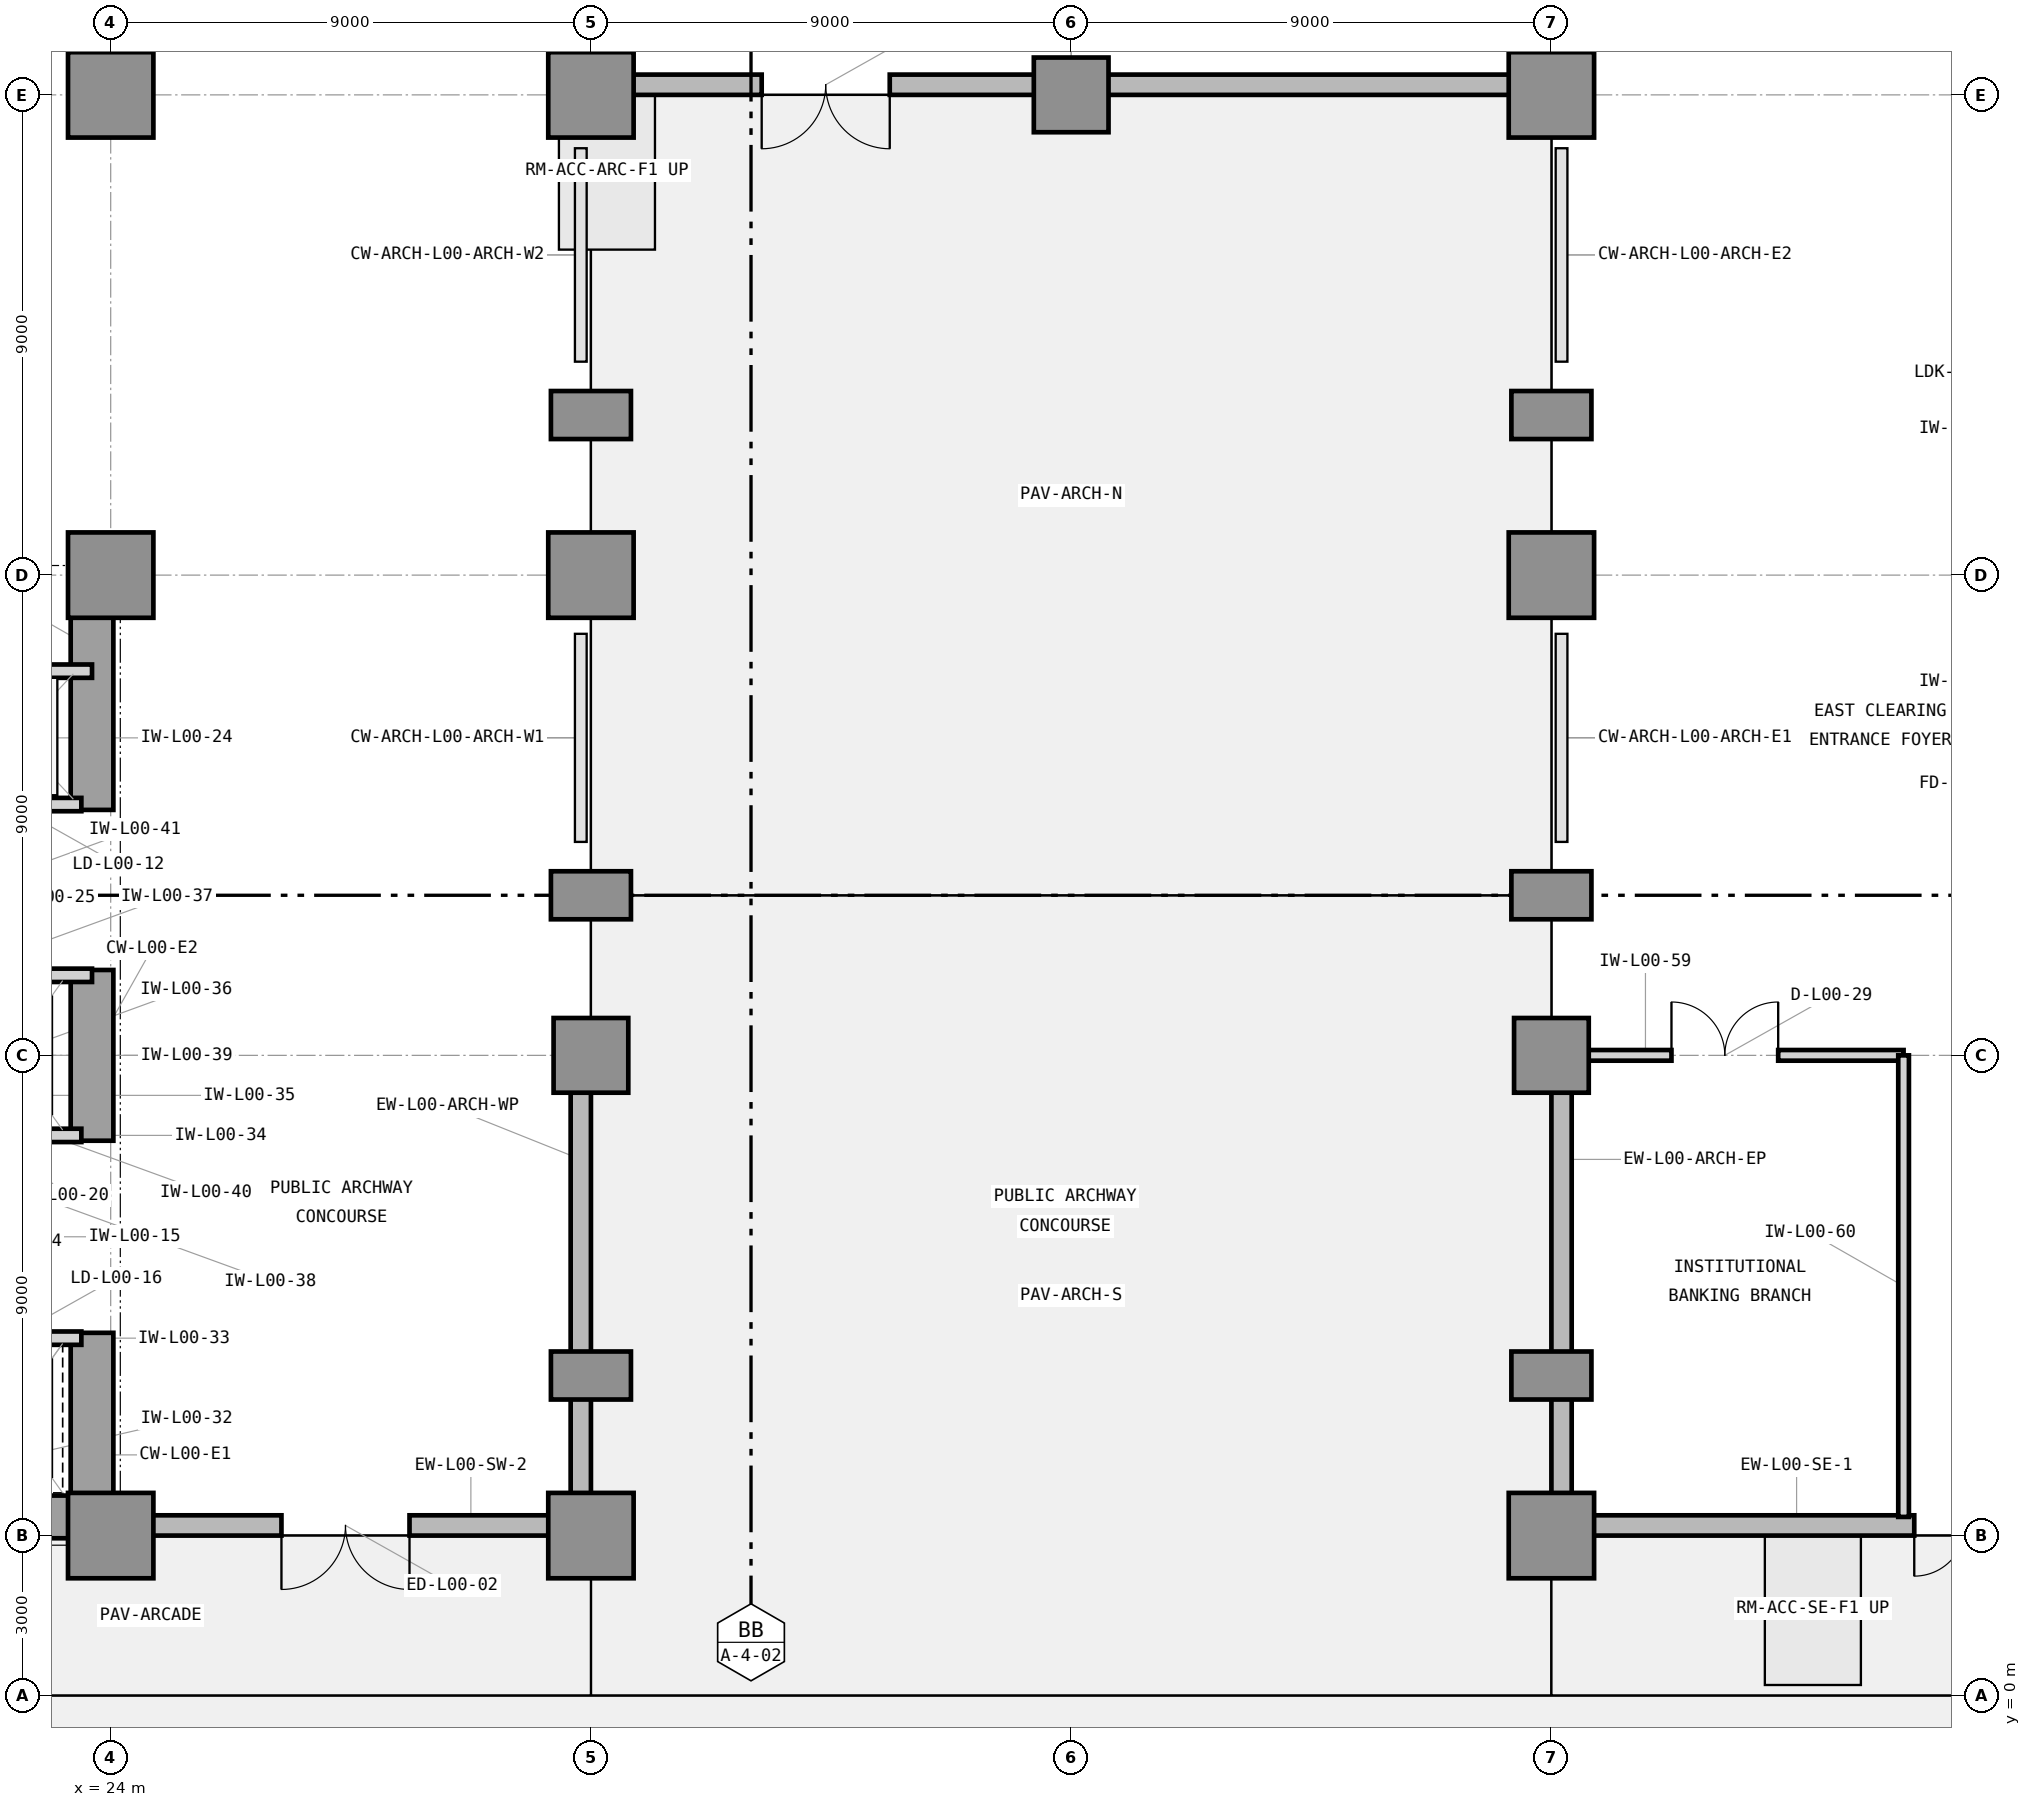
"""IFC4 building model, lengths in metres.
Left out: names, types, materials, properties, quantities, classifications, styles, units other than length and angle.
Written with IfcOpenShell. Run it as: python <this file> out.ifc"""

import sys

from ifc_helpers import new_model, si_unit, direction, frame, frame_2d, origin, origin_2d, place, context, subcontext, project, spatial, rectangle, extrude, element, fill, save


model = new_model("IFC4")
c1 = context("Model", 3, precision=1e-05, world=origin(), true_north=direction((0.0, 1.0)))
c2 = subcontext(c1, "Body", "Model", "MODEL_VIEW")
j1 = project(units=[si_unit("LENGTHUNIT", "METRE"), si_unit("PLANEANGLEUNIT", "RADIAN")], contexts=[c1])
p1 = place(None, origin())
s1 = spatial("IfcSite", under=j1, at=p1, CompositionType="ELEMENT")
p2 = place(p1, origin())
s2 = spatial("IfcBuilding", under=s1, at=p2, CompositionType="ELEMENT")
p3 = place(p2, origin())
s3 = spatial("IfcBuildingStorey", under=s2, at=p3, CompositionType="ELEMENT", Elevation=0.0)
p4 = place(p3, frame((7.475, 3.35, 0.0), z_axis=(0.0, 0.0, 1.0), x_axis=(1.0, 0.0, 0.0)))
e1 = element("IfcWall", 1, at=p4, inside=s3, PredefinedType="SHEAR", context=c2, shape_type="SweptSolid", body=[
    extrude(rectangle(XDim=16.575, YDim=0.8, at=frame_2d((8.288, 0.0))), origin(), (0.0, 0.0, 1.0), 5.4),
])
p5 = place(p3, frame((23.65, 3.75, 0.0), z_axis=(0.0, 0.0, 1.0), x_axis=(0.0, 1.0, 0.0)))
e2 = element("IfcWall", 2, at=p5, inside=s3, PredefinedType="SHEAR", context=c2, shape_type="SweptSolid", body=[
    extrude(rectangle(XDim=3.05, YDim=0.8, at=frame_2d((1.525, 0.0))), origin(), (0.0, 0.0, 1.0), 5.4),
])
p6 = place(p3, frame((23.65, 10.4, 0.0), z_axis=(0.0, 0.0, 1.0), x_axis=(0.0, 1.0, 0.0)))
e3 = element("IfcWall", 3, at=p6, inside=s3, PredefinedType="SHEAR", context=c2, shape_type="SweptSolid", body=[
    extrude(rectangle(XDim=3.2, YDim=0.8, at=frame_2d((1.6, 0.0))), origin(), (0.0, 0.0, 1.0), 5.4),
])
p7 = place(p3, frame((23.65, 16.6, 0.0), z_axis=(0.0, 0.0, 1.0), x_axis=(0.0, 1.0, 0.0)))
e4 = element("IfcWall", 4, at=p7, inside=s3, PredefinedType="SHEAR", context=c2, shape_type="SweptSolid", body=[
    extrude(rectangle(XDim=4.05, YDim=0.8, at=frame_2d((2.025, 0.0))), origin(), (0.0, 0.0, 1.0), 5.4),
])
for number, where, z_axis, x_axis in (
    (5, (24.0, 3.0, 0.0), (0.0, 0.0, 1.0), (1.0, 0.0, 0.0)),
    (6, (24.0, 21.0, 0.0), (0.0, 0.0, 1.0), (1.0, 0.0, 0.0)),
    (7, (24.0, 30.0, 0.0), (0.0, 0.0, 1.0), (1.0, 0.0, 0.0)),
    (8, (33.0, 3.0, 0.0), (0.0, 0.0, 1.0), (1.0, 0.0, 0.0)),
):
    element("IfcColumn", number, at=place(p3, frame(where, z_axis=z_axis, x_axis=x_axis)), inside=s3, PredefinedType="COLUMN", context=c2, shape_type="SweptSolid", body=[
        extrude(rectangle(XDim=1.6, YDim=1.6, at=origin_2d()), origin(), (0.0, 0.0, 1.0), 5.4),
    ])
p8 = place(p3, frame((33.0, 12.0, 0.0), z_axis=(0.0, 0.0, 1.0), x_axis=(1.0, 0.0, 0.0)))
e9 = element("IfcColumn", 9, at=p8, inside=s3, PredefinedType="COLUMN", context=c2, shape_type="SweptSolid", body=[
    extrude(rectangle(XDim=1.4, YDim=1.4, at=origin_2d()), origin(), (0.0, 0.0, 1.0), 5.4),
])
for number, where, z_axis, x_axis in (
    (10, (33.0, 21.0, 0.0), (0.0, 0.0, 1.0), (1.0, 0.0, 0.0)),
    (11, (33.0, 30.0, 0.0), (0.0, 0.0, 1.0), (1.0, 0.0, 0.0)),
):
    element("IfcColumn", number, at=place(p3, frame(where, z_axis=z_axis, x_axis=x_axis)), inside=s3, PredefinedType="COLUMN", context=c2, shape_type="SweptSolid", body=[
        extrude(rectangle(XDim=1.6, YDim=1.6, at=origin_2d()), origin(), (0.0, 0.0, 1.0), 5.4),
    ])
p9 = place(p3, frame((42.0, 30.0, 0.0), z_axis=(0.0, 0.0, 1.0), x_axis=(1.0, 0.0, 0.0)))
e12 = element("IfcColumn", 12, at=p9, inside=s3, PredefinedType="COLUMN", context=c2, shape_type="SweptSolid", body=[
    extrude(rectangle(XDim=1.4, YDim=1.4, at=origin_2d()), origin(), (0.0, 0.0, 1.0), 5.4),
])
p10 = place(p3, frame((51.0, 3.0, 0.0), z_axis=(0.0, 0.0, 1.0), x_axis=(1.0, 0.0, 0.0)))
e13 = element("IfcColumn", 13, at=p10, inside=s3, PredefinedType="COLUMN", context=c2, shape_type="SweptSolid", body=[
    extrude(rectangle(XDim=1.6, YDim=1.6, at=origin_2d()), origin(), (0.0, 0.0, 1.0), 5.4),
])
p11 = place(p3, frame((51.0, 12.0, 0.0), z_axis=(0.0, 0.0, 1.0), x_axis=(1.0, 0.0, 0.0)))
e14 = element("IfcColumn", 14, at=p11, inside=s3, PredefinedType="COLUMN", context=c2, shape_type="SweptSolid", body=[
    extrude(rectangle(XDim=1.4, YDim=1.4, at=origin_2d()), origin(), (0.0, 0.0, 1.0), 5.4),
])
for number, where, z_axis, x_axis in (
    (15, (51.0, 21.0, 0.0), (0.0, 0.0, 1.0), (1.0, 0.0, 0.0)),
    (16, (51.0, 30.0, 0.0), (0.0, 0.0, 1.0), (1.0, 0.0, 0.0)),
):
    element("IfcColumn", number, at=place(p3, frame(where, z_axis=z_axis, x_axis=x_axis)), inside=s3, PredefinedType="COLUMN", context=c2, shape_type="SweptSolid", body=[
        extrude(rectangle(XDim=1.6, YDim=1.6, at=origin_2d()), origin(), (0.0, 0.0, 1.0), 5.4),
    ])
for number, where, z_axis, x_axis in (
    (17, (33.0, 6.0, 0.0), (0.0, 0.0, 1.0), (1.0, 0.0, 0.0)),
    (18, (33.0, 15.0, 0.0), (0.0, 0.0, 1.0), (1.0, 0.0, 0.0)),
    (19, (33.0, 24.0, 0.0), (0.0, 0.0, 1.0), (1.0, 0.0, 0.0)),
    (20, (51.0, 6.0, 0.0), (0.0, 0.0, 1.0), (1.0, 0.0, 0.0)),
    (21, (51.0, 15.0, 0.0), (0.0, 0.0, 1.0), (1.0, 0.0, 0.0)),
    (22, (51.0, 24.0, 0.0), (0.0, 0.0, 1.0), (1.0, 0.0, 0.0)),
):
    element("IfcColumn", number, at=place(p3, frame(where, z_axis=z_axis, x_axis=x_axis)), inside=s3, PredefinedType="PILASTER", context=c2, shape_type="SweptSolid", body=[
        extrude(rectangle(XDim=0.9, YDim=1.5, at=origin_2d()), origin(), (0.0, 0.0, 1.0), 5.4),
    ])
p12 = place(p3, frame((24.0, 3.19, 0.0), z_axis=(0.0, 0.0, 1.0), x_axis=(1.0, 0.0, 0.0)))
e23 = element("IfcWall", 23, at=p12, inside=s3, PredefinedType="STANDARD", context=c2, shape_type="SweptSolid", body=[
    extrude(rectangle(XDim=9.0, YDim=0.38, at=frame_2d((4.5, 0.0))), origin(), (0.0, 0.0, 1.0), 4.234),
])
p13 = place(p12, frame((3.2, 0.0, 0.0)))
e24 = element("IfcOpeningElement", 24, at=p13, cuts=e23, PredefinedType="OPENING", context=c2, shape_type="SweptSolid", body=[
    extrude(rectangle(XDim=2.4, YDim=2.8, at=frame_2d((1.2, 1.4))), frame((0.0, 0.2, 0.0), z_axis=(0.0, -1.0, 0.0), x_axis=(1.0, 0.0, 0.0)), (0.0, 0.0, 1.0), 0.4),
])
p14 = place(p3, frame((32.81, 12.4, 0.0), z_axis=(0.0, 0.0, 1.0), x_axis=(0.0, -1.0, 0.0)))
e25 = element("IfcWall", 25, at=p14, inside=s3, PredefinedType="STANDARD", context=c2, shape_type="SweptSolid", body=[
    extrude(rectangle(XDim=9.4, YDim=0.38, at=frame_2d((4.7, 0.0))), origin(), (0.0, 0.0, 1.0), 4.234),
])
p15 = place(p3, frame((33.0, 30.19, 0.0), z_axis=(0.0, 0.0, 1.0), x_axis=(1.0, 0.0, 0.0)))
e26 = element("IfcWall", 26, at=p15, inside=s3, PredefinedType="STANDARD", context=c2, shape_type="SweptSolid", body=[
    extrude(rectangle(XDim=18.0, YDim=0.38, at=frame_2d((9.0, 0.0))), origin(), (0.0, 0.0, 1.0), 4.234),
])
p16 = place(p15, frame((3.2, 0.0, 0.0)))
e27 = element("IfcOpeningElement", 27, at=p16, cuts=e26, PredefinedType="OPENING", context=c2, shape_type="SweptSolid", body=[
    extrude(rectangle(XDim=2.4, YDim=2.8, at=frame_2d((1.2, 1.4))), frame((0.0, 0.2, 0.0), z_axis=(0.0, -1.0, 0.0), x_axis=(1.0, 0.0, 0.0)), (0.0, 0.0, 1.0), 0.4),
])
p17 = place(p3, frame((51.19, 3.0, 0.0), z_axis=(0.0, 0.0, 1.0), x_axis=(0.0, 1.0, 0.0)))
e28 = element("IfcWall", 28, at=p17, inside=s3, PredefinedType="STANDARD", context=c2, shape_type="SweptSolid", body=[
    extrude(rectangle(XDim=9.4, YDim=0.38, at=frame_2d((4.7, 0.0))), origin(), (0.0, 0.0, 1.0), 4.234),
])
p18 = place(p3, frame((51.0, 3.19, 0.0), z_axis=(0.0, 0.0, 1.0), x_axis=(1.0, 0.0, 0.0)))
e29 = element("IfcWall", 29, at=p18, inside=s3, PredefinedType="STANDARD", context=c2, shape_type="SweptSolid", body=[
    extrude(rectangle(XDim=18.38, YDim=0.38, at=frame_2d((9.19, 0.0))), origin(), (0.0, 0.0, 1.0), 4.234),
])
p19 = place(p18, frame((6.8, 0.0, 0.0)))
e30 = element("IfcOpeningElement", 30, at=p19, cuts=e29, PredefinedType="OPENING", context=c2, shape_type="SweptSolid", body=[
    extrude(rectangle(XDim=1.9, YDim=2.4, at=frame_2d((0.95, 1.2))), frame((0.0, 0.2, 0.0), z_axis=(0.0, -1.0, 0.0), x_axis=(1.0, 0.0, 0.0)), (0.0, 0.0, 1.0), 0.4),
])
p20 = place(p3, frame((21.05, 16.7, 0.0), z_axis=(0.0, 0.0, 1.0), x_axis=(1.0, 0.0, 0.0)))
e31 = element("IfcWall", 31, at=p20, inside=s3, PredefinedType="PARTITIONING", context=c2, shape_type="SweptSolid", body=[
    extrude(rectangle(XDim=2.4, YDim=0.25, at=frame_2d((1.2, 0.0))), origin(), (0.0, 0.0, 1.0), 4.473),
])
p21 = place(p20, frame((0.52, 0.0, 0.0)))
e32 = element("IfcOpeningElement", 32, at=p21, cuts=e31, PredefinedType="OPENING", context=c2, shape_type="SweptSolid", body=[
    extrude(rectangle(XDim=1.15, YDim=2.25, at=frame_2d((0.575, 1.125))), frame((0.0, 0.135, 0.0), z_axis=(0.0, -1.0, 0.0), x_axis=(1.0, 0.0, 0.0)), (0.0, 0.0, 1.0), 0.27),
])
p22 = place(p3, frame((16.45, 19.2, 0.0), z_axis=(0.0, 0.0, 1.0), x_axis=(1.0, 0.0, 0.0)))
e33 = element("IfcWall", 33, at=p22, inside=s3, PredefinedType="PARTITIONING", context=c2, shape_type="SweptSolid", body=[
    extrude(rectangle(XDim=7.2, YDim=0.25, at=frame_2d((3.6, 0.0))), origin(), (0.0, 0.0, 1.0), 5.09),
])
p23 = place(p3, frame((21.05, 6.7, 0.0), z_axis=(0.0, 0.0, 1.0), x_axis=(1.0, 0.0, 0.0)))
e34 = element("IfcWall", 34, at=p23, inside=s3, PredefinedType="PARTITIONING", context=c2, shape_type="SweptSolid", body=[
    extrude(rectangle(XDim=2.4, YDim=0.25, at=frame_2d((1.2, 0.0))), origin(), (0.0, 0.0, 1.0), 4.473),
])
p24 = place(p23, frame((0.48, 0.0, 0.0)))
e35 = element("IfcOpeningElement", 35, at=p24, cuts=e34, PredefinedType="OPENING", context=c2, shape_type="SweptSolid", body=[
    extrude(rectangle(XDim=1.15, YDim=2.25, at=frame_2d((0.575, 1.125))), frame((0.0, 0.135, 0.0), z_axis=(0.0, -1.0, 0.0), x_axis=(1.0, 0.0, 0.0)), (0.0, 0.0, 1.0), 0.27),
])
p25 = place(p3, frame((21.05, 10.5, 0.0), z_axis=(0.0, 0.0, 1.0), x_axis=(1.0, 0.0, 0.0)))
e36 = element("IfcWall", 36, at=p25, inside=s3, PredefinedType="PARTITIONING", context=c2, shape_type="SweptSolid", body=[
    extrude(rectangle(XDim=2.4, YDim=0.25, at=frame_2d((1.2, 0.0))), origin(), (0.0, 0.0, 1.0), 4.473),
])
p26 = place(p25, frame((0.48, 0.0, 0.0)))
e37 = element("IfcOpeningElement", 37, at=p26, cuts=e36, PredefinedType="OPENING", context=c2, shape_type="SweptSolid", body=[
    extrude(rectangle(XDim=1.15, YDim=2.25, at=frame_2d((0.575, 1.125))), frame((0.0, 0.135, 0.0), z_axis=(0.0, -1.0, 0.0), x_axis=(1.0, 0.0, 0.0)), (0.0, 0.0, 1.0), 0.27),
])
p27 = place(p3, frame((14.7, 13.5, 0.0), z_axis=(0.0, 0.0, 1.0), x_axis=(1.0, 0.0, 0.0)))
e38 = element("IfcWall", 38, at=p27, inside=s3, PredefinedType="PARTITIONING", context=c2, shape_type="SweptSolid", body=[
    extrude(rectangle(XDim=8.95, YDim=0.25, at=frame_2d((4.475, 0.0))), origin(), (0.0, 0.0, 1.0), 4.473),
])
p28 = place(p3, frame((51.15, 30.0, 0.0), z_axis=(0.0, 0.0, 1.0), x_axis=(0.0, 1.0, 0.0)))
e39 = element("IfcWall", 39, at=p28, inside=s3, PredefinedType="PARTITIONING", context=c2, shape_type="SweptSolid", body=[
    extrude(rectangle(XDim=10.15, YDim=0.2, at=frame_2d((5.075, 0.0))), origin(), (0.0, 0.0, 1.0), 4.234),
])
p29 = place(p28, frame((3.8, 0.0, 0.0)))
e40 = element("IfcOpeningElement", 40, at=p29, cuts=e39, PredefinedType="OPENING", context=c2, shape_type="SweptSolid", body=[
    extrude(rectangle(XDim=2.0, YDim=2.5, at=frame_2d((1.0, 1.25))), frame((0.0, 0.11, 0.0), z_axis=(0.0, -1.0, 0.0), x_axis=(1.0, 0.0, 0.0)), (0.0, 0.0, 1.0), 0.22),
])
p30 = place(p3, frame((51.15, 12.0, 0.0), z_axis=(0.0, 0.0, 1.0), x_axis=(1.0, 0.0, 0.0)))
e41 = element("IfcWall", 41, at=p30, inside=s3, PredefinedType="PARTITIONING", context=c2, shape_type="SweptSolid", body=[
    extrude(rectangle(XDim=6.45, YDim=0.2, at=frame_2d((3.225, 0.0))), origin(), (0.0, 0.0, 1.0), 4.234),
])
p31 = place(p30, frame((2.1, 0.0, 0.0)))
e42 = element("IfcOpeningElement", 42, at=p31, cuts=e41, PredefinedType="OPENING", context=c2, shape_type="SweptSolid", body=[
    extrude(rectangle(XDim=2.0, YDim=2.5, at=frame_2d((1.0, 1.25))), frame((0.0, 0.11, 0.0), z_axis=(0.0, -1.0, 0.0), x_axis=(1.0, 0.0, 0.0)), (0.0, 0.0, 1.0), 0.22),
])
p32 = place(p3, frame((57.6, 3.35, 0.0), z_axis=(0.0, 0.0, 1.0), x_axis=(0.0, 1.0, 0.0)))
e43 = element("IfcWall", 43, at=p32, inside=s3, PredefinedType="PARTITIONING", context=c2, shape_type="SweptSolid", body=[
    extrude(rectangle(XDim=8.65, YDim=0.2, at=frame_2d((4.325, 0.0))), origin(), (0.0, 0.0, 1.0), 5.09),
])
p33 = place(p13, frame((2.4, 0.0, 0.0), z_axis=(0.0, 0.0, 1.0), x_axis=(-1.0, 0.0, 0.0)))
e44 = element("IfcDoor", 44, at=p33, inside=s3, OperationType="DOUBLE_DOOR_SINGLE_SWING", PredefinedType="DOOR", context=c2, shape_type="SweptSolid", body=[
    extrude(rectangle(XDim=2.4, YDim=2.8, at=frame_2d((1.2, 1.4))), frame((0.0, 0.025, 0.0), z_axis=(0.0, -1.0, 0.0), x_axis=(1.0, 0.0, 0.0)), (0.0, 0.0, 1.0), 0.05),
])
fill(e24, e44)
p34 = place(p16, frame((2.4, 0.0, 0.0), z_axis=(0.0, 0.0, 1.0), x_axis=(-1.0, 0.0, 0.0)))
e45 = element("IfcDoor", 45, at=p34, inside=s3, OperationType="DOUBLE_DOOR_SINGLE_SWING", PredefinedType="DOOR", context=c2, shape_type="SweptSolid", body=[
    extrude(rectangle(XDim=2.4, YDim=2.8, at=frame_2d((1.2, 1.4))), frame((0.0, 0.025, 0.0), z_axis=(0.0, -1.0, 0.0), x_axis=(1.0, 0.0, 0.0)), (0.0, 0.0, 1.0), 0.05),
])
fill(e27, e45)
p35 = place(p19, frame((1.9, 0.0, 0.0), z_axis=(0.0, 0.0, 1.0), x_axis=(-1.0, 0.0, 0.0)))
e46 = element("IfcDoor", 46, at=p35, inside=s3, OperationType="DOUBLE_DOOR_SINGLE_SWING", PredefinedType="DOOR", context=c2, shape_type="SweptSolid", body=[
    extrude(rectangle(XDim=1.9, YDim=2.4, at=frame_2d((0.95, 1.2))), frame((0.0, 0.025, 0.0), z_axis=(0.0, -1.0, 0.0), x_axis=(1.0, 0.0, 0.0)), (0.0, 0.0, 1.0), 0.05),
])
fill(e30, e46)
p36 = place(p31, origin())
e47 = element("IfcDoor", 47, at=p36, inside=s3, OperationType="DOUBLE_DOOR_SINGLE_SWING", PredefinedType="DOOR", context=c2, shape_type="SweptSolid", body=[
    extrude(rectangle(XDim=2.0, YDim=2.5, at=frame_2d((1.0, 1.25))), frame((0.0, 0.025, 0.0), z_axis=(0.0, -1.0, 0.0), x_axis=(1.0, 0.0, 0.0)), (0.0, 0.0, 1.0), 0.05),
])
fill(e42, e47)
save(model, sys.argv[1])
